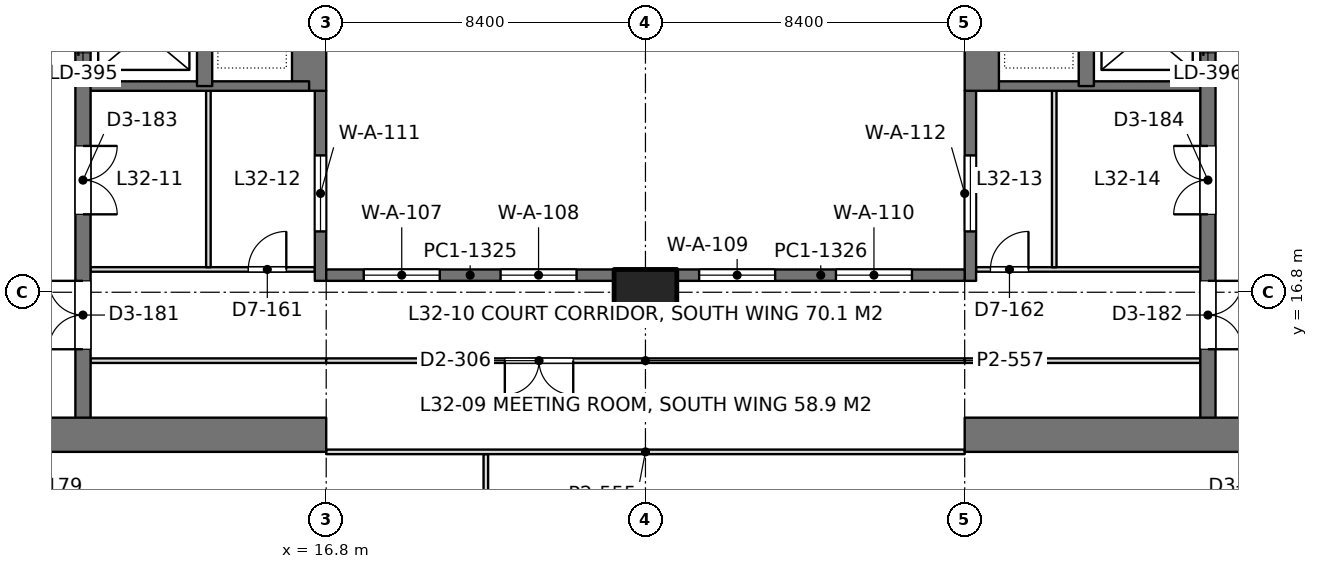
"""IFC4 building model, lengths in metres.
Left out: names, types, materials, properties, quantities, classifications, styles, units other than length and angle.
Written with IfcOpenShell. Run it as: python <this file> out.ifc"""

import sys

from ifc_helpers import new_model, si_unit, direction, frame, frame_2d, origin, origin_2d, place, context, subcontext, project, spatial, rectangle, extrude, element, fill, save


model = new_model("IFC4")
c1 = context("Model", 3, precision=1e-05, world=origin(), true_north=direction((0.0, 1.0)))
c2 = subcontext(c1, "Body", "Model", "MODEL_VIEW")
j1 = project(units=[si_unit("LENGTHUNIT", "METRE"), si_unit("PLANEANGLEUNIT", "RADIAN")], contexts=[c1])
p1 = place(None, origin())
s1 = spatial("IfcSite", under=j1, at=p1, CompositionType="ELEMENT")
p2 = place(p1, origin())
s2 = spatial("IfcBuilding", under=s1, at=p2, CompositionType="ELEMENT")
p3 = place(p2, frame((0.0, 0.0, 142.8)))
s3 = spatial("IfcBuildingStorey", under=s2, at=p3, CompositionType="ELEMENT", Elevation=142.8)
p4 = place(p3, frame((25.2, 16.8, 0.0), z_axis=(0.0, 0.0, 1.0), x_axis=(1.0, 0.0, 0.0)))
e1 = element("IfcColumn", 1, at=p4, inside=s3, PredefinedType="COLUMN", context=c2, shape_type="SweptSolid", body=[
    extrude(rectangle(XDim=1.65, YDim=1.2, at=origin_2d()), origin(), (0.0, 0.0, 1.0), 4.2),
])
p5 = place(p3, frame((-1.2, 13.05, 0.0), z_axis=(0.0, 0.0, 1.0), x_axis=(1.0, 0.0, 0.0)))
e2 = element("IfcWall", 2, at=p5, inside=s3, PredefinedType="SHEAR", context=c2, shape_type="SweptSolid", body=[
    extrude(rectangle(XDim=18.0, YDim=0.9, at=frame_2d((9.0, 0.0))), origin(), (0.0, 0.0, 1.0), 4.2),
])
p6 = place(p5, frame((8.95, 0.0, 0.0)))
e3 = element("IfcOpeningElement", 3, at=p6, cuts=e2, PredefinedType="OPENING", context=c2, shape_type="SweptSolid", body=[
    extrude(rectangle(XDim=1.8, YDim=2.4, at=frame_2d((0.9, 1.2))), frame((0.0, 0.46, 0.0), z_axis=(0.0, -1.0, 0.0), x_axis=(1.0, 0.0, 0.0)), (0.0, 0.0, 1.0), 0.92),
])
p7 = place(p3, frame((16.35, 22.1, 0.0), z_axis=(0.0, 0.0, 1.0), x_axis=(0.0, 1.0, 0.0)))
e4 = element("IfcWall", 4, at=p7, inside=s3, PredefinedType="SHEAR", context=c2, shape_type="SweptSolid", body=[
    extrude(rectangle(XDim=15.25, YDim=0.9, at=frame_2d((7.625, 0.0))), origin(), (0.0, 0.0, 1.0), 4.2),
])
p8 = place(p3, frame((10.4, 13.05, 0.0), z_axis=(0.0, 0.0, 1.0), x_axis=(0.0, 1.0, 0.0)))
e5 = element("IfcWall", 5, at=p8, inside=s3, PredefinedType="SHEAR", context=c2, shape_type="SweptSolid", body=[
    extrude(rectangle(XDim=24.3, YDim=0.4, at=frame_2d((12.15, 0.0))), origin(), (0.0, 0.0, 1.0), 4.2),
])
p9 = place(p8, frame((10.05, 0.0, 0.0)))
e6 = element("IfcOpeningElement", 6, at=p9, cuts=e5, PredefinedType="OPENING", context=c2, shape_type="SweptSolid", body=[
    extrude(rectangle(XDim=1.1, YDim=2.2, at=frame_2d((0.55, 1.1))), frame((0.0, 0.21, 0.0), z_axis=(0.0, -1.0, 0.0), x_axis=(1.0, 0.0, 0.0)), (0.0, 0.0, 1.0), 0.42),
])
p10 = place(p8, frame((12.9, 0.0, 0.0)))
e7 = element("IfcOpeningElement", 7, at=p10, cuts=e5, PredefinedType="OPENING", context=c2, shape_type="SweptSolid", body=[
    extrude(rectangle(XDim=1.1, YDim=2.2, at=frame_2d((0.55, 1.1))), frame((0.0, 0.21, 0.0), z_axis=(0.0, -1.0, 0.0), x_axis=(1.0, 0.0, 0.0)), (0.0, 0.0, 1.0), 0.42),
])
p11 = place(p8, frame((21.45, 0.0, 0.0)))
e8 = element("IfcOpeningElement", 8, at=p11, cuts=e5, PredefinedType="OPENING", context=c2, shape_type="SweptSolid", body=[
    extrude(rectangle(XDim=1.1, YDim=2.2, at=frame_2d((0.55, 1.1))), frame((0.0, 0.21, 0.0), z_axis=(0.0, -1.0, 0.0), x_axis=(1.0, 0.0, 0.0)), (0.0, 0.0, 1.0), 0.42),
])
p12 = place(p8, frame((2.25, 0.0, 0.0)))
e9 = element("IfcOpeningElement", 9, at=p12, cuts=e5, PredefinedType="OPENING", context=c2, shape_type="SweptSolid", body=[
    extrude(rectangle(XDim=1.8, YDim=2.4, at=frame_2d((0.9, 1.2))), frame((0.0, 0.21, 0.0), z_axis=(0.0, -1.0, 0.0), x_axis=(1.0, 0.0, 0.0)), (0.0, 0.0, 1.0), 0.42),
])
p13 = place(p8, frame((5.8, 0.0, 0.0)))
e10 = element("IfcOpeningElement", 10, at=p13, cuts=e5, PredefinedType="OPENING", context=c2, shape_type="SweptSolid", body=[
    extrude(rectangle(XDim=1.8, YDim=2.4, at=frame_2d((0.9, 1.2))), frame((0.0, 0.21, 0.0), z_axis=(0.0, -1.0, 0.0), x_axis=(1.0, 0.0, 0.0)), (0.0, 0.0, 1.0), 0.42),
])
p14 = place(p3, frame((13.6, 22.225, 0.0), z_axis=(0.0, 0.0, 1.0), x_axis=(0.0, 1.0, 0.0)))
e11 = element("IfcWall", 11, at=p14, inside=s3, PredefinedType="SHEAR", context=c2, shape_type="SweptSolid", body=[
    extrude(rectangle(XDim=15.125, YDim=0.4, at=frame_2d((7.562, 0.0))), origin(), (0.0, 0.0, 1.0), 4.2),
])
p15 = place(p3, frame((10.4, 22.225, 0.0), z_axis=(0.0, 0.0, 1.0), x_axis=(1.0, 0.0, 0.0)))
e12 = element("IfcWall", 12, at=p15, inside=s3, PredefinedType="SHEAR", context=c2, shape_type="SweptSolid", body=[
    extrude(rectangle(XDim=5.95, YDim=0.25, at=frame_2d((2.975, 0.0))), origin(), (0.0, 0.0, 1.0), 4.2),
])
p16 = place(p3, frame((33.6, 13.05, 0.0), z_axis=(0.0, 0.0, 1.0), x_axis=(1.0, 0.0, 0.0)))
e13 = element("IfcWall", 13, at=p16, inside=s3, PredefinedType="SHEAR", context=c2, shape_type="SweptSolid", body=[
    extrude(rectangle(XDim=18.0, YDim=0.9, at=frame_2d((9.0, 0.0))), origin(), (0.0, 0.0, 1.0), 4.2),
])
p17 = place(p16, frame((7.25, 0.0, 0.0)))
e14 = element("IfcOpeningElement", 14, at=p17, cuts=e13, PredefinedType="OPENING", context=c2, shape_type="SweptSolid", body=[
    extrude(rectangle(XDim=1.8, YDim=2.4, at=frame_2d((0.9, 1.2))), frame((0.0, 0.46, 0.0), z_axis=(0.0, -1.0, 0.0), x_axis=(1.0, 0.0, 0.0)), (0.0, 0.0, 1.0), 0.92),
])
p18 = place(p3, frame((34.05, 22.1, 0.0), z_axis=(0.0, 0.0, 1.0), x_axis=(0.0, 1.0, 0.0)))
e15 = element("IfcWall", 15, at=p18, inside=s3, PredefinedType="SHEAR", context=c2, shape_type="SweptSolid", body=[
    extrude(rectangle(XDim=15.25, YDim=0.9, at=frame_2d((7.625, 0.0))), origin(), (0.0, 0.0, 1.0), 4.2),
])
p19 = place(p3, frame((40.0, 13.05, 0.0), z_axis=(0.0, 0.0, 1.0), x_axis=(0.0, 1.0, 0.0)))
e16 = element("IfcWall", 16, at=p19, inside=s3, PredefinedType="SHEAR", context=c2, shape_type="SweptSolid", body=[
    extrude(rectangle(XDim=24.3, YDim=0.4, at=frame_2d((12.15, 0.0))), origin(), (0.0, 0.0, 1.0), 4.2),
])
p20 = place(p19, frame((10.05, 0.0, 0.0)))
e17 = element("IfcOpeningElement", 17, at=p20, cuts=e16, PredefinedType="OPENING", context=c2, shape_type="SweptSolid", body=[
    extrude(rectangle(XDim=1.1, YDim=2.2, at=frame_2d((0.55, 1.1))), frame((0.0, 0.21, 0.0), z_axis=(0.0, -1.0, 0.0), x_axis=(1.0, 0.0, 0.0)), (0.0, 0.0, 1.0), 0.42),
])
p21 = place(p19, frame((12.9, 0.0, 0.0)))
e18 = element("IfcOpeningElement", 18, at=p21, cuts=e16, PredefinedType="OPENING", context=c2, shape_type="SweptSolid", body=[
    extrude(rectangle(XDim=1.1, YDim=2.2, at=frame_2d((0.55, 1.1))), frame((0.0, 0.21, 0.0), z_axis=(0.0, -1.0, 0.0), x_axis=(1.0, 0.0, 0.0)), (0.0, 0.0, 1.0), 0.42),
])
p22 = place(p19, frame((21.45, 0.0, 0.0)))
e19 = element("IfcOpeningElement", 19, at=p22, cuts=e16, PredefinedType="OPENING", context=c2, shape_type="SweptSolid", body=[
    extrude(rectangle(XDim=1.1, YDim=2.2, at=frame_2d((0.55, 1.1))), frame((0.0, 0.21, 0.0), z_axis=(0.0, -1.0, 0.0), x_axis=(1.0, 0.0, 0.0)), (0.0, 0.0, 1.0), 0.42),
])
p23 = place(p19, frame((2.25, 0.0, 0.0)))
e20 = element("IfcOpeningElement", 20, at=p23, cuts=e16, PredefinedType="OPENING", context=c2, shape_type="SweptSolid", body=[
    extrude(rectangle(XDim=1.8, YDim=2.4, at=frame_2d((0.9, 1.2))), frame((0.0, 0.21, 0.0), z_axis=(0.0, -1.0, 0.0), x_axis=(1.0, 0.0, 0.0)), (0.0, 0.0, 1.0), 0.42),
])
p24 = place(p19, frame((5.8, 0.0, 0.0)))
e21 = element("IfcOpeningElement", 21, at=p24, cuts=e16, PredefinedType="OPENING", context=c2, shape_type="SweptSolid", body=[
    extrude(rectangle(XDim=1.8, YDim=2.4, at=frame_2d((0.9, 1.2))), frame((0.0, 0.21, 0.0), z_axis=(0.0, -1.0, 0.0), x_axis=(1.0, 0.0, 0.0)), (0.0, 0.0, 1.0), 0.42),
])
p25 = place(p3, frame((36.8, 22.225, 0.0), z_axis=(0.0, 0.0, 1.0), x_axis=(0.0, 1.0, 0.0)))
e22 = element("IfcWall", 22, at=p25, inside=s3, PredefinedType="SHEAR", context=c2, shape_type="SweptSolid", body=[
    extrude(rectangle(XDim=15.125, YDim=0.4, at=frame_2d((7.562, 0.0))), origin(), (0.0, 0.0, 1.0), 4.2),
])
p26 = place(p3, frame((40.0, 22.225, 0.0), z_axis=(0.0, 0.0, 1.0), x_axis=(-1.0, 0.0, 0.0)))
e23 = element("IfcWall", 23, at=p26, inside=s3, PredefinedType="SHEAR", context=c2, shape_type="SweptSolid", body=[
    extrude(rectangle(XDim=5.95, YDim=0.25, at=frame_2d((2.975, 0.0))), origin(), (0.0, 0.0, 1.0), 4.2),
])
p27 = place(p3, frame((16.65, 17.1, 0.0), z_axis=(0.0, 0.0, 1.0), x_axis=(0.0, 1.0, 0.0)))
e24 = element("IfcWall", 24, at=p27, inside=s3, PredefinedType="SOLIDWALL", context=c2, shape_type="SweptSolid", body=[
    extrude(rectangle(XDim=5.0, YDim=0.3, at=frame_2d((2.5, 0.0))), origin(), (0.0, 0.0, 1.0), 4.05),
])
p28 = place(p27, frame((1.3, 0.0, 0.1)))
e25 = element("IfcOpeningElement", 25, at=p28, cuts=e24, PredefinedType="OPENING", context=c2, shape_type="SweptSolid", body=[
    extrude(rectangle(XDim=2.0, YDim=3.0, at=frame_2d((1.0, 1.5))), frame((0.0, 0.16, 0.0), z_axis=(0.0, -1.0, 0.0), x_axis=(1.0, 0.0, 0.0)), (0.0, 0.0, 1.0), 0.32),
])
p29 = place(p3, frame((33.75, 17.1, 0.0), z_axis=(0.0, 0.0, 1.0), x_axis=(0.0, 1.0, 0.0)))
e26 = element("IfcWall", 26, at=p29, inside=s3, PredefinedType="SOLIDWALL", context=c2, shape_type="SweptSolid", body=[
    extrude(rectangle(XDim=5.0, YDim=0.3, at=frame_2d((2.5, 0.0))), origin(), (0.0, 0.0, 1.0), 4.05),
])
p30 = place(p29, frame((1.3, 0.0, 0.1)))
e27 = element("IfcOpeningElement", 27, at=p30, cuts=e26, PredefinedType="OPENING", context=c2, shape_type="SweptSolid", body=[
    extrude(rectangle(XDim=2.0, YDim=3.0, at=frame_2d((1.0, 1.5))), frame((0.0, 0.16, 0.0), z_axis=(0.0, -1.0, 0.0), x_axis=(1.0, 0.0, 0.0)), (0.0, 0.0, 1.0), 0.32),
])
p31 = place(p3, frame((16.8, 17.25, 0.0), z_axis=(0.0, 0.0, 1.0), x_axis=(1.0, 0.0, 0.0)))
e28 = element("IfcWall", 28, at=p31, inside=s3, PredefinedType="SOLIDWALL", context=c2, shape_type="SweptSolid", body=[
    extrude(rectangle(XDim=7.575, YDim=0.3, at=frame_2d((3.788, 0.0))), origin(), (0.0, 0.0, 1.0), 4.05),
])
p32 = place(p31, frame((0.988, 0.0, 0.1)))
e29 = element("IfcOpeningElement", 29, at=p32, cuts=e28, PredefinedType="OPENING", context=c2, shape_type="SweptSolid", body=[
    extrude(rectangle(XDim=2.0, YDim=3.0, at=frame_2d((1.0, 1.5))), frame((0.0, 0.16, 0.0), z_axis=(0.0, -1.0, 0.0), x_axis=(1.0, 0.0, 0.0)), (0.0, 0.0, 1.0), 0.32),
])
p33 = place(p31, frame((4.587, 0.0, 0.1)))
e30 = element("IfcOpeningElement", 30, at=p33, cuts=e28, PredefinedType="OPENING", context=c2, shape_type="SweptSolid", body=[
    extrude(rectangle(XDim=2.0, YDim=3.0, at=frame_2d((1.0, 1.5))), frame((0.0, 0.16, 0.0), z_axis=(0.0, -1.0, 0.0), x_axis=(1.0, 0.0, 0.0)), (0.0, 0.0, 1.0), 0.32),
])
p34 = place(p3, frame((26.025, 17.25, 0.0), z_axis=(0.0, 0.0, 1.0), x_axis=(1.0, 0.0, 0.0)))
e31 = element("IfcWall", 31, at=p34, inside=s3, PredefinedType="SOLIDWALL", context=c2, shape_type="SweptSolid", body=[
    extrude(rectangle(XDim=7.575, YDim=0.3, at=frame_2d((3.788, 0.0))), origin(), (0.0, 0.0, 1.0), 4.05),
])
p35 = place(p34, frame((0.587, 0.0, 0.1)))
e32 = element("IfcOpeningElement", 32, at=p35, cuts=e31, PredefinedType="OPENING", context=c2, shape_type="SweptSolid", body=[
    extrude(rectangle(XDim=2.0, YDim=3.0, at=frame_2d((1.0, 1.5))), frame((0.0, 0.16, 0.0), z_axis=(0.0, -1.0, 0.0), x_axis=(1.0, 0.0, 0.0)), (0.0, 0.0, 1.0), 0.32),
])
p36 = place(p34, frame((4.188, 0.0, 0.1)))
e33 = element("IfcOpeningElement", 33, at=p36, cuts=e31, PredefinedType="OPENING", context=c2, shape_type="SweptSolid", body=[
    extrude(rectangle(XDim=2.0, YDim=3.0, at=frame_2d((1.0, 1.5))), frame((0.0, 0.16, 0.0), z_axis=(0.0, -1.0, 0.0), x_axis=(1.0, 0.0, 0.0)), (0.0, 0.0, 1.0), 0.32),
])
p37 = place(p3, frame((10.598, 17.4, 0.0), z_axis=(0.0, 0.0, 1.0), x_axis=(1.0, 0.0, 0.0)))
e34 = element("IfcWall", 34, at=p37, inside=s3, PredefinedType="PARTITIONING", context=c2, shape_type="SweptSolid", body=[
    extrude(rectangle(XDim=5.904, YDim=0.12, at=frame_2d((2.952, 0.0))), origin(), (0.0, 0.0, 1.0), 3.55),
])
p38 = place(p37, frame((4.152, 0.0, 0.0)))
e35 = element("IfcOpeningElement", 35, at=p38, cuts=e34, PredefinedType="OPENING", context=c2, shape_type="SweptSolid", body=[
    extrude(rectangle(XDim=1.0, YDim=2.4, at=frame_2d((0.5, 1.2))), frame((0.0, 0.07, 0.0), z_axis=(0.0, -1.0, 0.0), x_axis=(1.0, 0.0, 0.0)), (0.0, 0.0, 1.0), 0.14),
])
p39 = place(p3, frame((13.7, 17.458, 0.0), z_axis=(0.0, 0.0, 1.0), x_axis=(0.0, 1.0, 0.0)))
e36 = element("IfcWall", 36, at=p39, inside=s3, PredefinedType="PARTITIONING", context=c2, shape_type="SweptSolid", body=[
    extrude(rectangle(XDim=4.644, YDim=0.12, at=frame_2d((2.322, 0.0))), origin(), (0.0, 0.0, 1.0), 3.6),
])
p40 = place(p3, frame((33.898, 17.4, 0.0), z_axis=(0.0, 0.0, 1.0), x_axis=(1.0, 0.0, 0.0)))
e37 = element("IfcWall", 37, at=p40, inside=s3, PredefinedType="PARTITIONING", context=c2, shape_type="SweptSolid", body=[
    extrude(rectangle(XDim=5.904, YDim=0.12, at=frame_2d((2.952, 0.0))), origin(), (0.0, 0.0, 1.0), 3.55),
])
p41 = place(p40, frame((0.38, 0.0, 0.0)))
e38 = element("IfcOpeningElement", 38, at=p41, cuts=e37, PredefinedType="OPENING", context=c2, shape_type="SweptSolid", body=[
    extrude(rectangle(XDim=1.0, YDim=2.4, at=frame_2d((0.5, 1.2))), frame((0.0, 0.07, 0.0), z_axis=(0.0, -1.0, 0.0), x_axis=(1.0, 0.0, 0.0)), (0.0, 0.0, 1.0), 0.14),
])
p42 = place(p3, frame((35.956, 17.458, 0.0), z_axis=(0.0, 0.0, 1.0), x_axis=(0.0, 1.0, 0.0)))
e39 = element("IfcWall", 39, at=p42, inside=s3, PredefinedType="PARTITIONING", context=c2, shape_type="SweptSolid", body=[
    extrude(rectangle(XDim=4.644, YDim=0.12, at=frame_2d((2.322, 0.0))), origin(), (0.0, 0.0, 1.0), 3.6),
])
p43 = place(p3, frame((21.0, 1.898, 0.0), z_axis=(0.0, 0.0, 1.0), x_axis=(0.0, 1.0, 0.0)))
e40 = element("IfcWall", 40, at=p43, inside=s3, PredefinedType="PARTITIONING", context=c2, shape_type="SweptSolid", body=[
    extrude(rectangle(XDim=10.644, YDim=0.12, at=frame_2d((5.322, 0.0))), origin(), (0.0, 0.0, 1.0), 3.55),
])
for number, where, z_axis, x_axis in (
    (41, (10.598, 15.0, 0.0), (0.0, 0.0, 1.0), (1.0, 0.0, 0.0)),
    (42, (33.598, 15.0, 0.0), (0.0, 0.0, 1.0), (1.0, 0.0, 0.0)),
):
    element("IfcWall", number, at=place(p3, frame(where, z_axis=z_axis, x_axis=x_axis)), inside=s3, PredefinedType="PARTITIONING", context=c2, shape_type="SweptSolid", body=[
        extrude(rectangle(XDim=6.204, YDim=0.12, at=frame_2d((3.102, 0.0))), origin(), (0.0, 0.0, 1.0), 3.55),
    ])
p44 = place(p3, frame((16.798, 15.0, 0.0), z_axis=(0.0, 0.0, 1.0), x_axis=(1.0, 0.0, 0.0)))
e43 = element("IfcWall", 43, at=p44, inside=s3, PredefinedType="PARTITIONING", context=c2, shape_type="SweptSolid", body=[
    extrude(rectangle(XDim=16.804, YDim=0.12, at=frame_2d((8.402, 0.0))), origin(), (0.0, 0.0, 1.0), 3.55),
])
p45 = place(p44, frame((4.702, 0.0, 0.0)))
e44 = element("IfcOpeningElement", 44, at=p45, cuts=e43, PredefinedType="OPENING", context=c2, shape_type="SweptSolid", body=[
    extrude(rectangle(XDim=1.8, YDim=2.2, at=frame_2d((0.9, 1.1))), frame((0.0, 0.07, 0.0), z_axis=(0.0, -1.0, 0.0), x_axis=(1.0, 0.0, 0.0)), (0.0, 0.0, 1.0), 0.14),
])
p46 = place(p3, frame((16.8, 12.6, 0.0), z_axis=(0.0, 0.0, 1.0), x_axis=(1.0, 0.0, 0.0)))
e45 = element("IfcWall", 45, at=p46, inside=s3, PredefinedType="PARTITIONING", context=c2, shape_type="SweptSolid", body=[
    extrude(rectangle(XDim=16.8, YDim=0.12, at=frame_2d((8.4, 0.0))), origin(), (0.0, 0.0, 1.0), 3.55),
])
p47 = place(p28, origin())
e46 = element("IfcWindow", 46, at=p47, inside=s3, PartitioningType="SINGLE_PANEL", PredefinedType="WINDOW", context=c2, shape_type="SweptSolid", body=[
    extrude(rectangle(XDim=2.0, YDim=3.0, at=frame_2d((1.0, 1.5))), frame((0.0, 0.03, 0.0), z_axis=(0.0, -1.0, 0.0), x_axis=(1.0, 0.0, 0.0)), (0.0, 0.0, 1.0), 0.06),
])
fill(e25, e46)
p48 = place(p30, origin())
e47 = element("IfcWindow", 47, at=p48, inside=s3, PartitioningType="SINGLE_PANEL", PredefinedType="WINDOW", context=c2, shape_type="SweptSolid", body=[
    extrude(rectangle(XDim=2.0, YDim=3.0, at=frame_2d((1.0, 1.5))), frame((0.0, 0.03, 0.0), z_axis=(0.0, -1.0, 0.0), x_axis=(1.0, 0.0, 0.0)), (0.0, 0.0, 1.0), 0.06),
])
fill(e27, e47)
p49 = place(p32, origin())
e48 = element("IfcWindow", 48, at=p49, inside=s3, PartitioningType="SINGLE_PANEL", PredefinedType="WINDOW", context=c2, shape_type="SweptSolid", body=[
    extrude(rectangle(XDim=2.0, YDim=3.0, at=frame_2d((1.0, 1.5))), frame((0.0, 0.03, 0.0), z_axis=(0.0, -1.0, 0.0), x_axis=(1.0, 0.0, 0.0)), (0.0, 0.0, 1.0), 0.06),
])
fill(e29, e48)
p50 = place(p33, origin())
e49 = element("IfcWindow", 49, at=p50, inside=s3, PartitioningType="SINGLE_PANEL", PredefinedType="WINDOW", context=c2, shape_type="SweptSolid", body=[
    extrude(rectangle(XDim=2.0, YDim=3.0, at=frame_2d((1.0, 1.5))), frame((0.0, 0.03, 0.0), z_axis=(0.0, -1.0, 0.0), x_axis=(1.0, 0.0, 0.0)), (0.0, 0.0, 1.0), 0.06),
])
fill(e30, e49)
p51 = place(p35, origin())
e50 = element("IfcWindow", 50, at=p51, inside=s3, PartitioningType="SINGLE_PANEL", PredefinedType="WINDOW", context=c2, shape_type="SweptSolid", body=[
    extrude(rectangle(XDim=2.0, YDim=3.0, at=frame_2d((1.0, 1.5))), frame((0.0, 0.03, 0.0), z_axis=(0.0, -1.0, 0.0), x_axis=(1.0, 0.0, 0.0)), (0.0, 0.0, 1.0), 0.06),
])
fill(e32, e50)
p52 = place(p36, origin())
e51 = element("IfcWindow", 51, at=p52, inside=s3, PartitioningType="SINGLE_PANEL", PredefinedType="WINDOW", context=c2, shape_type="SweptSolid", body=[
    extrude(rectangle(XDim=2.0, YDim=3.0, at=frame_2d((1.0, 1.5))), frame((0.0, 0.03, 0.0), z_axis=(0.0, -1.0, 0.0), x_axis=(1.0, 0.0, 0.0)), (0.0, 0.0, 1.0), 0.06),
])
fill(e33, e51)
p53 = place(p12, origin())
e52 = element("IfcDoor", 52, at=p53, inside=s3, OperationType="DOUBLE_DOOR_SINGLE_SWING", PredefinedType="DOOR", context=c2, shape_type="SweptSolid", body=[
    extrude(rectangle(XDim=1.8, YDim=2.4, at=frame_2d((0.9, 1.2))), frame((0.0, 0.025, 0.0), z_axis=(0.0, -1.0, 0.0), x_axis=(1.0, 0.0, 0.0)), (0.0, 0.0, 1.0), 0.05),
])
fill(e9, e52)
p54 = place(p13, frame((1.8, 0.0, 0.0), z_axis=(0.0, 0.0, 1.0), x_axis=(-1.0, 0.0, 0.0)))
e53 = element("IfcDoor", 53, at=p54, inside=s3, OperationType="DOUBLE_DOOR_SINGLE_SWING", PredefinedType="DOOR", context=c2, shape_type="SweptSolid", body=[
    extrude(rectangle(XDim=1.8, YDim=2.4, at=frame_2d((0.9, 1.2))), frame((0.0, 0.025, 0.0), z_axis=(0.0, -1.0, 0.0), x_axis=(1.0, 0.0, 0.0)), (0.0, 0.0, 1.0), 0.05),
])
fill(e10, e53)
p55 = place(p23, frame((1.8, 0.0, 0.0), z_axis=(0.0, 0.0, 1.0), x_axis=(-1.0, 0.0, 0.0)))
e54 = element("IfcDoor", 54, at=p55, inside=s3, OperationType="DOUBLE_DOOR_SINGLE_SWING", PredefinedType="DOOR", context=c2, shape_type="SweptSolid", body=[
    extrude(rectangle(XDim=1.8, YDim=2.4, at=frame_2d((0.9, 1.2))), frame((0.0, 0.025, 0.0), z_axis=(0.0, -1.0, 0.0), x_axis=(1.0, 0.0, 0.0)), (0.0, 0.0, 1.0), 0.05),
])
fill(e20, e54)
p56 = place(p24, origin())
e55 = element("IfcDoor", 55, at=p56, inside=s3, OperationType="DOUBLE_DOOR_SINGLE_SWING", PredefinedType="DOOR", context=c2, shape_type="SweptSolid", body=[
    extrude(rectangle(XDim=1.8, YDim=2.4, at=frame_2d((0.9, 1.2))), frame((0.0, 0.025, 0.0), z_axis=(0.0, -1.0, 0.0), x_axis=(1.0, 0.0, 0.0)), (0.0, 0.0, 1.0), 0.05),
])
fill(e21, e55)
p57 = place(p38, origin())
e56 = element("IfcDoor", 56, at=p57, inside=s3, OperationType="SINGLE_SWING_RIGHT", PredefinedType="DOOR", context=c2, shape_type="SweptSolid", body=[
    extrude(rectangle(XDim=1.0, YDim=2.4, at=frame_2d((0.5, 1.2))), frame((0.0, 0.025, 0.0), z_axis=(0.0, -1.0, 0.0), x_axis=(1.0, 0.0, 0.0)), (0.0, 0.0, 1.0), 0.05),
])
fill(e35, e56)
p58 = place(p41, origin())
e57 = element("IfcDoor", 57, at=p58, inside=s3, OperationType="SINGLE_SWING_RIGHT", PredefinedType="DOOR", context=c2, shape_type="SweptSolid", body=[
    extrude(rectangle(XDim=1.0, YDim=2.4, at=frame_2d((0.5, 1.2))), frame((0.0, 0.025, 0.0), z_axis=(0.0, -1.0, 0.0), x_axis=(1.0, 0.0, 0.0)), (0.0, 0.0, 1.0), 0.05),
])
fill(e38, e57)
p59 = place(p45, frame((1.8, 0.0, 0.0), z_axis=(0.0, 0.0, 1.0), x_axis=(-1.0, 0.0, 0.0)))
e58 = element("IfcDoor", 58, at=p59, inside=s3, OperationType="DOUBLE_DOOR_SINGLE_SWING", PredefinedType="DOOR", context=c2, shape_type="SweptSolid", body=[
    extrude(rectangle(XDim=1.8, YDim=2.2, at=frame_2d((0.9, 1.1))), frame((0.0, 0.025, 0.0), z_axis=(0.0, -1.0, 0.0), x_axis=(1.0, 0.0, 0.0)), (0.0, 0.0, 1.0), 0.05),
])
fill(e44, e58)
save(model, sys.argv[1])
